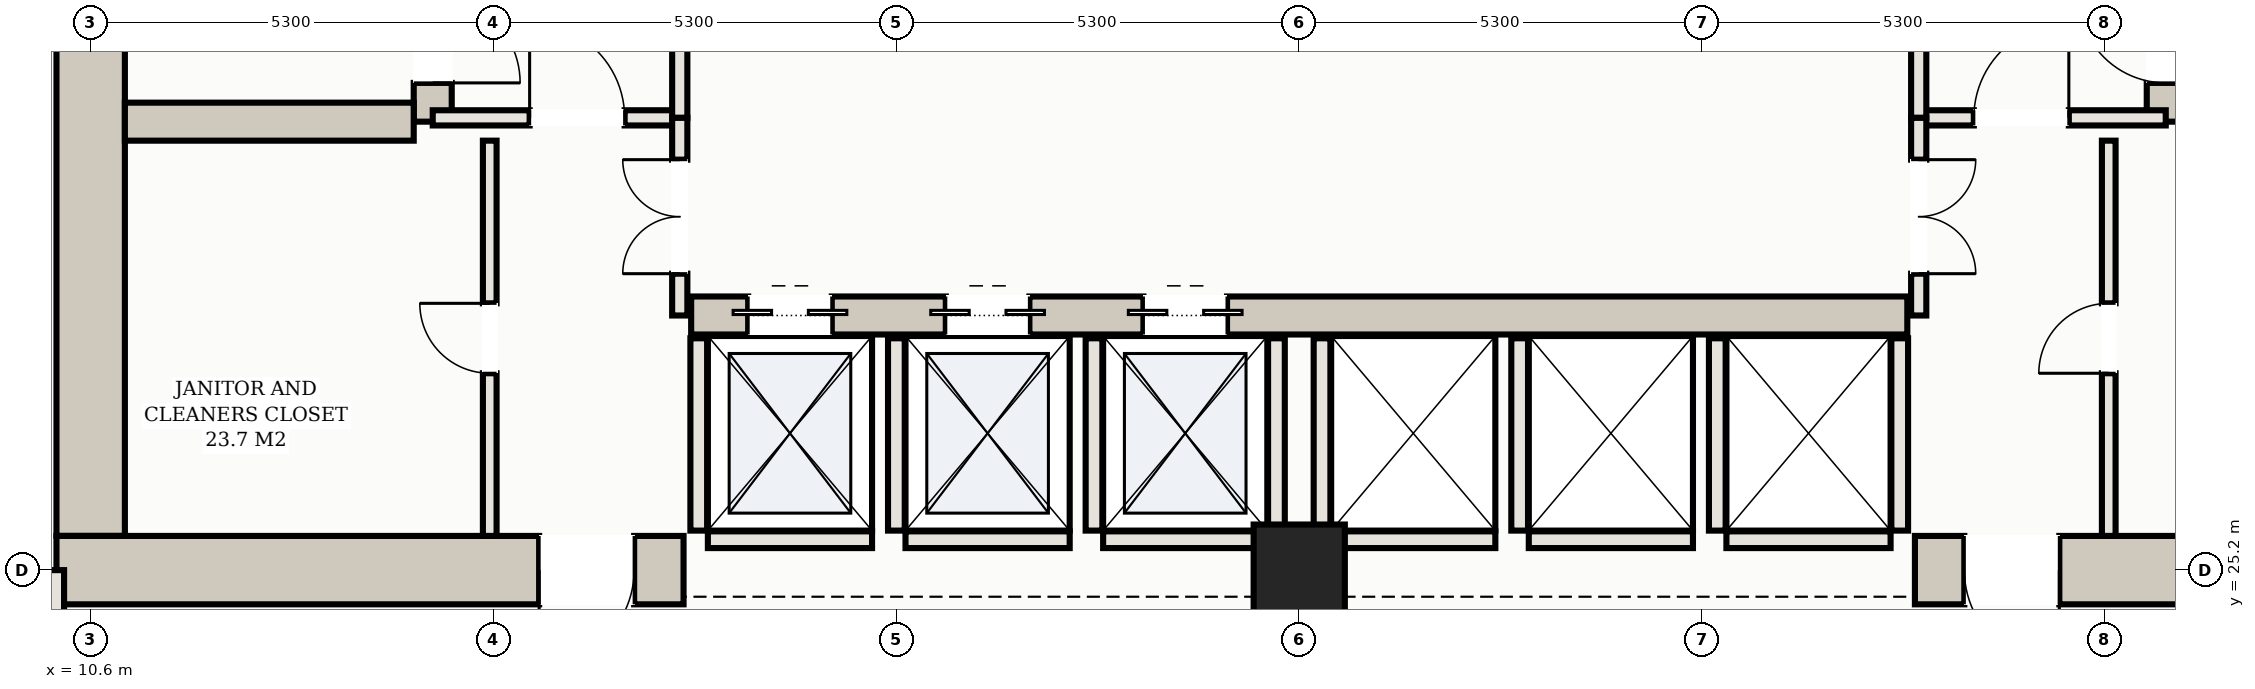
"""IFC4 building model, lengths in metres.
Left out: names, types, materials, properties, quantities, classifications, styles, units other than length and angle.
Written with IfcOpenShell. Run it as: python <this file> out.ifc"""

import sys

from ifc_helpers import new_model, si_unit, direction, frame, frame_2d, origin, origin_2d, place, context, subcontext, project, spatial, rectangle, hollow_rectangle, extrude, element, fill, save


model = new_model("IFC4")
c1 = context("Model", 3, precision=1e-05, world=origin(), true_north=direction((0.0, 1.0)))
c2 = subcontext(c1, "Body", "Model", "MODEL_VIEW")
j1 = project(units=[si_unit("LENGTHUNIT", "METRE"), si_unit("PLANEANGLEUNIT", "RADIAN")], contexts=[c1])
p1 = place(None, origin())
s1 = spatial("IfcSite", under=j1, at=p1, CompositionType="ELEMENT")
p2 = place(p1, origin())
s2 = spatial("IfcBuilding", under=s1, at=p2, CompositionType="ELEMENT")
p3 = place(p2, frame((0.0, 0.0, 24.2)))
s3 = spatial("IfcBuildingStorey", under=s2, at=p3, CompositionType="ELEMENT", Elevation=24.2)
p4 = place(p3, frame((10.6, 25.65, 0.0), z_axis=(0.0, 0.0, 1.0), x_axis=(0.0, 1.0, 0.0)))
e1 = element("IfcWall", 1, at=p4, inside=s3, PredefinedType="SHEAR", context=c2, shape_type="SweptSolid", body=[
    extrude(rectangle(XDim=13.9, YDim=0.9, at=frame_2d((6.95, 0.0))), origin(), (0.0, 0.0, 1.0), 3.08),
])
p5 = place(p3, frame((10.15, 25.2, 0.0), z_axis=(0.0, 0.0, 1.0), x_axis=(1.0, 0.0, 0.0)))
e2 = element("IfcWall", 2, at=p5, inside=s3, PredefinedType="SHEAR", context=c2, shape_type="SweptSolid", body=[
    extrude(rectangle(XDim=8.25, YDim=0.9, at=frame_2d((4.125, 0.0))), origin(), (0.0, 0.0, 1.0), 3.08),
])
p6 = place(p5, frame((6.35, 0.0, 0.0)))
e3 = element("IfcOpeningElement", 3, at=p6, cuts=e2, PredefinedType="OPENING", context=c2, shape_type="SweptSolid", body=[
    extrude(rectangle(XDim=1.25, YDim=2.2, at=frame_2d((0.625, 1.1))), frame((0.0, 0.46, 0.0), z_axis=(0.0, -1.0, 0.0), x_axis=(1.0, 0.0, 0.0)), (0.0, 0.0, 1.0), 0.92),
])
p7 = place(p3, frame((34.6, 25.2, 0.0), z_axis=(0.0, 0.0, 1.0), x_axis=(1.0, 0.0, 0.0)))
e4 = element("IfcWall", 4, at=p7, inside=s3, PredefinedType="SHEAR", context=c2, shape_type="SweptSolid", body=[
    extrude(rectangle(XDim=8.25, YDim=0.9, at=frame_2d((4.125, 0.0))), origin(), (0.0, 0.0, 1.0), 3.08),
])
p8 = place(p7, frame((0.65, 0.0, 0.0)))
e5 = element("IfcOpeningElement", 5, at=p8, cuts=e4, PredefinedType="OPENING", context=c2, shape_type="SweptSolid", body=[
    extrude(rectangle(XDim=1.25, YDim=2.2, at=frame_2d((0.625, 1.1))), frame((0.0, 0.46, 0.0), z_axis=(0.0, -1.0, 0.0), x_axis=(1.0, 0.0, 0.0)), (0.0, 0.0, 1.0), 0.92),
])
p9 = place(p3, frame((15.1, 31.1, 0.0), z_axis=(0.0, 0.0, 1.0), x_axis=(0.0, 1.0, 0.0)))
e6 = element("IfcWall", 6, at=p9, inside=s3, PredefinedType="SHEAR", context=c2, shape_type="SweptSolid", body=[
    extrude(rectangle(XDim=8.45, YDim=0.5, at=frame_2d((4.225, 0.0))), origin(), (0.0, 0.0, 1.0), 3.08),
])
p10 = place(p9, frame((0.51, 0.0, 0.0)))
e7 = element("IfcOpeningElement", 7, at=p10, cuts=e6, PredefinedType="OPENING", context=c2, shape_type="SweptSolid", body=[
    extrude(rectangle(XDim=1.15, YDim=2.2, at=frame_2d((0.575, 1.1))), frame((0.0, 0.26, 0.0), z_axis=(0.0, -1.0, 0.0), x_axis=(1.0, 0.0, 0.0)), (0.0, 0.0, 1.0), 0.52),
])
p11 = place(p3, frame((11.05, 31.1, 0.0), z_axis=(0.0, 0.0, 1.0), x_axis=(1.0, 0.0, 0.0)))
e8 = element("IfcWall", 8, at=p11, inside=s3, PredefinedType="SHEAR", context=c2, shape_type="SweptSolid", body=[
    extrude(rectangle(XDim=3.8, YDim=0.5, at=frame_2d((1.9, 0.0))), origin(), (0.0, 0.0, 1.0), 3.08),
])
p12 = place(p3, frame((37.9, 31.1, 0.0), z_axis=(0.0, 0.0, 1.0), x_axis=(0.0, 1.0, 0.0)))
e9 = element("IfcWall", 9, at=p12, inside=s3, PredefinedType="SHEAR", context=c2, shape_type="SweptSolid", body=[
    extrude(rectangle(XDim=8.45, YDim=0.5, at=frame_2d((4.225, 0.0))), origin(), (0.0, 0.0, 1.0), 3.08),
])
p13 = place(p12, frame((0.51, 0.0, 0.0)))
e10 = element("IfcOpeningElement", 10, at=p13, cuts=e9, PredefinedType="OPENING", context=c2, shape_type="SweptSolid", body=[
    extrude(rectangle(XDim=1.15, YDim=2.2, at=frame_2d((0.575, 1.1))), frame((0.0, 0.26, 0.0), z_axis=(0.0, -1.0, 0.0), x_axis=(1.0, 0.0, 0.0)), (0.0, 0.0, 1.0), 0.52),
])
p14 = place(p3, frame((18.5, 28.55, 0.0), z_axis=(0.0, 0.0, 1.0), x_axis=(1.0, 0.0, 0.0)))
e11 = element("IfcWall", 11, at=p14, inside=s3, PredefinedType="SHEAR", context=c2, shape_type="SweptSolid", body=[
    extrude(rectangle(XDim=16.0, YDim=0.5, at=frame_2d((8.0, 0.0))), origin(), (0.0, 0.0, 1.0), 3.08),
])
p15 = place(p14, frame((0.75, 0.0, 0.0)))
e12 = element("IfcOpeningElement", 12, at=p15, cuts=e11, PredefinedType="OPENING", context=c2, shape_type="SweptSolid", body=[
    extrude(rectangle(XDim=1.1, YDim=2.15, at=frame_2d((0.55, 1.075))), frame((0.0, 0.26, 0.0), z_axis=(0.0, -1.0, 0.0), x_axis=(1.0, 0.0, 0.0)), (0.0, 0.0, 1.0), 0.52),
])
p16 = place(p14, frame((3.35, 0.0, 0.0)))
e13 = element("IfcOpeningElement", 13, at=p16, cuts=e11, PredefinedType="OPENING", context=c2, shape_type="SweptSolid", body=[
    extrude(rectangle(XDim=1.1, YDim=2.15, at=frame_2d((0.55, 1.075))), frame((0.0, 0.26, 0.0), z_axis=(0.0, -1.0, 0.0), x_axis=(1.0, 0.0, 0.0)), (0.0, 0.0, 1.0), 0.52),
])
p17 = place(p14, frame((5.95, 0.0, 0.0)))
e14 = element("IfcOpeningElement", 14, at=p17, cuts=e11, PredefinedType="OPENING", context=c2, shape_type="SweptSolid", body=[
    extrude(rectangle(XDim=1.1, YDim=2.15, at=frame_2d((0.55, 1.075))), frame((0.0, 0.26, 0.0), z_axis=(0.0, -1.0, 0.0), x_axis=(1.0, 0.0, 0.0)), (0.0, 0.0, 1.0), 0.52),
])
p18 = place(p3, frame((26.5, 25.2, 0.0), z_axis=(0.0, 0.0, 1.0), x_axis=(1.0, 0.0, 0.0)))
e15 = element("IfcColumn", 15, at=p18, inside=s3, PredefinedType="COLUMN", context=c2, shape_type="SweptSolid", body=[
    extrude(hollow_rectangle(XDim=1.2, YDim=1.2, WallThickness=0.04, at=origin_2d()), origin(), (0.0, 0.0, 1.0), 3.3),
])
p19 = place(p3, frame((18.6, 25.72, 0.0), z_axis=(0.0, 0.0, 1.0), x_axis=(0.0, 1.0, 0.0)))
e16 = element("IfcWall", 16, at=p19, inside=s3, PredefinedType="SOLIDWALL", context=c2, shape_type="SweptSolid", body=[
    extrude(rectangle(XDim=2.53, YDim=0.22, at=frame_2d((1.265, 0.0))), origin(), (0.0, 0.0, 1.0), 3.08),
])
p20 = place(p3, frame((18.72, 25.6, 0.0), z_axis=(0.0, 0.0, 1.0), x_axis=(1.0, 0.0, 0.0)))
e17 = element("IfcWall", 17, at=p20, inside=s3, PredefinedType="SOLIDWALL", context=c2, shape_type="SweptSolid", body=[
    extrude(rectangle(XDim=2.16, YDim=0.22, at=frame_2d((1.08, 0.0))), origin(), (0.0, 0.0, 1.0), 3.08),
])
p21 = place(p3, frame((21.2, 25.72, 0.0), z_axis=(0.0, 0.0, 1.0), x_axis=(0.0, 1.0, 0.0)))
e18 = element("IfcWall", 18, at=p21, inside=s3, PredefinedType="SOLIDWALL", context=c2, shape_type="SweptSolid", body=[
    extrude(rectangle(XDim=2.53, YDim=0.22, at=frame_2d((1.265, 0.0))), origin(), (0.0, 0.0, 1.0), 3.08),
])
p22 = place(p3, frame((21.32, 25.6, 0.0), z_axis=(0.0, 0.0, 1.0), x_axis=(1.0, 0.0, 0.0)))
e19 = element("IfcWall", 19, at=p22, inside=s3, PredefinedType="SOLIDWALL", context=c2, shape_type="SweptSolid", body=[
    extrude(rectangle(XDim=2.16, YDim=0.22, at=frame_2d((1.08, 0.0))), origin(), (0.0, 0.0, 1.0), 3.08),
])
for number, where, z_axis, x_axis in (
    (20, (23.8, 25.72, 0.0), (0.0, 0.0, 1.0), (0.0, 1.0, 0.0)),
    (21, (26.2, 25.72, 0.0), (0.0, 0.0, 1.0), (0.0, 1.0, 0.0)),
):
    element("IfcWall", number, at=place(p3, frame(where, z_axis=z_axis, x_axis=x_axis)), inside=s3, PredefinedType="SOLIDWALL", context=c2, shape_type="SweptSolid", body=[
        extrude(rectangle(XDim=2.53, YDim=0.22, at=frame_2d((1.265, 0.0))), origin(), (0.0, 0.0, 1.0), 3.08),
    ])
p23 = place(p3, frame((23.92, 25.6, 0.0), z_axis=(0.0, 0.0, 1.0), x_axis=(1.0, 0.0, 0.0)))
e22 = element("IfcWall", 22, at=p23, inside=s3, PredefinedType="SOLIDWALL", context=c2, shape_type="SweptSolid", body=[
    extrude(rectangle(XDim=2.16, YDim=0.22, at=frame_2d((1.08, 0.0))), origin(), (0.0, 0.0, 1.0), 3.08),
])
p24 = place(p3, frame((26.8, 25.72, 0.0), z_axis=(0.0, 0.0, 1.0), x_axis=(0.0, 1.0, 0.0)))
e23 = element("IfcWall", 23, at=p24, inside=s3, PredefinedType="SOLIDWALL", context=c2, shape_type="SweptSolid", body=[
    extrude(rectangle(XDim=2.53, YDim=0.22, at=frame_2d((1.265, 0.0))), origin(), (0.0, 0.0, 1.0), 3.08),
])
p25 = place(p3, frame((26.92, 25.6, 0.0), z_axis=(0.0, 0.0, 1.0), x_axis=(1.0, 0.0, 0.0)))
e24 = element("IfcWall", 24, at=p25, inside=s3, PredefinedType="SOLIDWALL", context=c2, shape_type="SweptSolid", body=[
    extrude(rectangle(XDim=2.16, YDim=0.22, at=frame_2d((1.08, 0.0))), origin(), (0.0, 0.0, 1.0), 3.08),
])
p26 = place(p3, frame((29.4, 25.72, 0.0), z_axis=(0.0, 0.0, 1.0), x_axis=(0.0, 1.0, 0.0)))
e25 = element("IfcWall", 25, at=p26, inside=s3, PredefinedType="SOLIDWALL", context=c2, shape_type="SweptSolid", body=[
    extrude(rectangle(XDim=2.53, YDim=0.22, at=frame_2d((1.265, 0.0))), origin(), (0.0, 0.0, 1.0), 3.08),
])
p27 = place(p3, frame((29.52, 25.6, 0.0), z_axis=(0.0, 0.0, 1.0), x_axis=(1.0, 0.0, 0.0)))
e26 = element("IfcWall", 26, at=p27, inside=s3, PredefinedType="SOLIDWALL", context=c2, shape_type="SweptSolid", body=[
    extrude(rectangle(XDim=2.16, YDim=0.22, at=frame_2d((1.08, 0.0))), origin(), (0.0, 0.0, 1.0), 3.08),
])
for number, where, z_axis, x_axis in (
    (27, (32.0, 25.72, 0.0), (0.0, 0.0, 1.0), (0.0, 1.0, 0.0)),
    (28, (34.4, 25.72, 0.0), (0.0, 0.0, 1.0), (0.0, 1.0, 0.0)),
):
    element("IfcWall", number, at=place(p3, frame(where, z_axis=z_axis, x_axis=x_axis)), inside=s3, PredefinedType="SOLIDWALL", context=c2, shape_type="SweptSolid", body=[
        extrude(rectangle(XDim=2.53, YDim=0.22, at=frame_2d((1.265, 0.0))), origin(), (0.0, 0.0, 1.0), 3.08),
    ])
p28 = place(p3, frame((32.12, 25.6, 0.0), z_axis=(0.0, 0.0, 1.0), x_axis=(1.0, 0.0, 0.0)))
e29 = element("IfcWall", 29, at=p28, inside=s3, PredefinedType="SOLIDWALL", context=c2, shape_type="SweptSolid", body=[
    extrude(rectangle(XDim=2.16, YDim=0.22, at=frame_2d((1.08, 0.0))), origin(), (0.0, 0.0, 1.0), 3.08),
])
p29 = place(p3, frame((15.1, 31.15, 0.0), z_axis=(0.0, 0.0, 1.0), x_axis=(1.0, 0.0, 0.0)))
e30 = element("IfcWall", 30, at=p29, inside=s3, PredefinedType="PARTITIONING", context=c2, shape_type="SweptSolid", body=[
    extrude(rectangle(XDim=3.25, YDim=0.2, at=frame_2d((1.625, 0.0))), origin(), (0.0, 0.0, 1.0), 2.57),
])
p30 = place(p29, frame((1.275, 0.0, 0.0)))
e31 = element("IfcOpeningElement", 31, at=p30, cuts=e30, PredefinedType="OPENING", context=c2, shape_type="SweptSolid", body=[
    extrude(rectangle(XDim=1.25, YDim=2.2, at=frame_2d((0.625, 1.1))), frame((0.0, 0.11, 0.0), z_axis=(0.0, -1.0, 0.0), x_axis=(1.0, 0.0, 0.0)), (0.0, 0.0, 1.0), 0.22),
])
p31 = place(p3, frame((18.35, 31.15, 0.0), z_axis=(0.0, 0.0, 1.0), x_axis=(0.0, 1.0, 0.0)))
e32 = element("IfcWall", 32, at=p31, inside=s3, PredefinedType="PARTITIONING", context=c2, shape_type="SweptSolid", body=[
    extrude(rectangle(XDim=5.15, YDim=0.2, at=frame_2d((2.575, 0.0))), origin(), (0.0, 0.0, 1.0), 2.57),
])
p32 = place(p31, frame((1.875, 0.0, 0.0)))
e33 = element("IfcOpeningElement", 33, at=p32, cuts=e32, PredefinedType="OPENING", context=c2, shape_type="SweptSolid", body=[
    extrude(rectangle(XDim=1.25, YDim=2.2, at=frame_2d((0.625, 1.1))), frame((0.0, 0.11, 0.0), z_axis=(0.0, -1.0, 0.0), x_axis=(1.0, 0.0, 0.0)), (0.0, 0.0, 1.0), 0.22),
])
p33 = place(p3, frame((34.65, 31.15, 0.0), z_axis=(0.0, 0.0, 1.0), x_axis=(1.0, 0.0, 0.0)))
e34 = element("IfcWall", 34, at=p33, inside=s3, PredefinedType="PARTITIONING", context=c2, shape_type="SweptSolid", body=[
    extrude(rectangle(XDim=3.25, YDim=0.2, at=frame_2d((1.625, 0.0))), origin(), (0.0, 0.0, 1.0), 2.57),
])
p34 = place(p33, frame((0.725, 0.0, 0.0)))
e35 = element("IfcOpeningElement", 35, at=p34, cuts=e34, PredefinedType="OPENING", context=c2, shape_type="SweptSolid", body=[
    extrude(rectangle(XDim=1.25, YDim=2.2, at=frame_2d((0.625, 1.1))), frame((0.0, 0.11, 0.0), z_axis=(0.0, -1.0, 0.0), x_axis=(1.0, 0.0, 0.0)), (0.0, 0.0, 1.0), 0.22),
])
p35 = place(p3, frame((34.65, 31.15, 0.0), z_axis=(0.0, 0.0, 1.0), x_axis=(0.0, 1.0, 0.0)))
e36 = element("IfcWall", 36, at=p35, inside=s3, PredefinedType="PARTITIONING", context=c2, shape_type="SweptSolid", body=[
    extrude(rectangle(XDim=5.15, YDim=0.2, at=frame_2d((2.575, 0.0))), origin(), (0.0, 0.0, 1.0), 2.57),
])
p36 = place(p35, frame((1.875, 0.0, 0.0)))
e37 = element("IfcOpeningElement", 37, at=p36, cuts=e36, PredefinedType="OPENING", context=c2, shape_type="SweptSolid", body=[
    extrude(rectangle(XDim=1.25, YDim=2.2, at=frame_2d((0.625, 1.1))), frame((0.0, 0.11, 0.0), z_axis=(0.0, -1.0, 0.0), x_axis=(1.0, 0.0, 0.0)), (0.0, 0.0, 1.0), 0.22),
])
p37 = place(p3, frame((15.85, 25.65, 0.0), z_axis=(0.0, 0.0, 1.0), x_axis=(0.0, 1.0, 0.0)))
e38 = element("IfcWall", 38, at=p37, inside=s3, PredefinedType="PARTITIONING", context=c2, shape_type="SweptSolid", body=[
    extrude(rectangle(XDim=5.2, YDim=0.18, at=frame_2d((2.6, 0.0))), origin(), (0.0, 0.0, 1.0), 2.57),
])
p38 = place(p37, frame((2.14, 0.0, 0.0)))
e39 = element("IfcOpeningElement", 39, at=p38, cuts=e38, PredefinedType="OPENING", context=c2, shape_type="SweptSolid", body=[
    extrude(rectangle(XDim=0.92, YDim=2.15, at=frame_2d((0.46, 1.075))), frame((0.0, 0.1, 0.0), z_axis=(0.0, -1.0, 0.0), x_axis=(1.0, 0.0, 0.0)), (0.0, 0.0, 1.0), 0.2),
])
p39 = place(p3, frame((37.15, 25.65, 0.0), z_axis=(0.0, 0.0, 1.0), x_axis=(0.0, 1.0, 0.0)))
e40 = element("IfcWall", 40, at=p39, inside=s3, PredefinedType="PARTITIONING", context=c2, shape_type="SweptSolid", body=[
    extrude(rectangle(XDim=5.2, YDim=0.18, at=frame_2d((2.6, 0.0))), origin(), (0.0, 0.0, 1.0), 2.57),
])
p40 = place(p39, frame((2.14, 0.0, 0.0)))
e41 = element("IfcOpeningElement", 41, at=p40, cuts=e40, PredefinedType="OPENING", context=c2, shape_type="SweptSolid", body=[
    extrude(rectangle(XDim=0.92, YDim=2.15, at=frame_2d((0.46, 1.075))), frame((0.0, 0.1, 0.0), z_axis=(0.0, -1.0, 0.0), x_axis=(1.0, 0.0, 0.0)), (0.0, 0.0, 1.0), 0.2),
])
p41 = place(p3, frame((18.35, 28.55, 0.0), z_axis=(0.0, 0.0, 1.0), x_axis=(0.0, 1.0, 0.0)))
e42 = element("IfcWall", 42, at=p41, inside=s3, PredefinedType="PARTITIONING", context=c2, shape_type="SweptSolid", body=[
    extrude(rectangle(XDim=2.6, YDim=0.2, at=frame_2d((1.3, 0.0))), origin(), (0.0, 0.0, 1.0), 2.57),
])
p42 = place(p41, frame((0.55, 0.0, 0.0)))
e43 = element("IfcOpeningElement", 43, at=p42, cuts=e42, PredefinedType="OPENING", context=c2, shape_type="SweptSolid", body=[
    extrude(rectangle(XDim=1.5, YDim=2.25, at=frame_2d((0.75, 1.125))), frame((0.0, 0.11, 0.0), z_axis=(0.0, -1.0, 0.0), x_axis=(1.0, 0.0, 0.0)), (0.0, 0.0, 1.0), 0.22),
])
p43 = place(p3, frame((34.65, 28.55, 0.0), z_axis=(0.0, 0.0, 1.0), x_axis=(0.0, 1.0, 0.0)))
e44 = element("IfcWall", 44, at=p43, inside=s3, PredefinedType="PARTITIONING", context=c2, shape_type="SweptSolid", body=[
    extrude(rectangle(XDim=2.6, YDim=0.2, at=frame_2d((1.3, 0.0))), origin(), (0.0, 0.0, 1.0), 2.57),
])
p44 = place(p43, frame((0.55, 0.0, 0.0)))
e45 = element("IfcOpeningElement", 45, at=p44, cuts=e44, PredefinedType="OPENING", context=c2, shape_type="SweptSolid", body=[
    extrude(rectangle(XDim=1.5, YDim=2.25, at=frame_2d((0.75, 1.125))), frame((0.0, 0.11, 0.0), z_axis=(0.0, -1.0, 0.0), x_axis=(1.0, 0.0, 0.0)), (0.0, 0.0, 1.0), 0.22),
])
p45 = place(p3, frame((10.15, 24.1, 0.0), z_axis=(0.0, 0.0, 1.0), x_axis=(0.0, 1.0, 0.0)))
e46 = element("IfcWall", 46, at=p45, inside=s3, PredefinedType="PARTITIONING", context=c2, shape_type="SweptSolid", body=[
    extrude(rectangle(XDim=1.1, YDim=0.2, at=frame_2d((0.55, 0.0))), origin(), (0.0, 0.0, 1.0), 2.57),
])
p46 = place(p15, origin())
e47 = element("IfcDoor", 47, at=p46, inside=s3, OperationType="DOUBLE_DOOR_SLIDING", PredefinedType="DOOR", context=c2, shape_type="SweptSolid", body=[
    extrude(rectangle(XDim=1.1, YDim=2.15, at=frame_2d((0.55, 1.075))), frame((0.0, 0.025, 0.0), z_axis=(0.0, -1.0, 0.0), x_axis=(1.0, 0.0, 0.0)), (0.0, 0.0, 1.0), 0.05),
])
fill(e12, e47)
p47 = place(p16, origin())
e48 = element("IfcDoor", 48, at=p47, inside=s3, OperationType="DOUBLE_DOOR_SLIDING", PredefinedType="DOOR", context=c2, shape_type="SweptSolid", body=[
    extrude(rectangle(XDim=1.1, YDim=2.15, at=frame_2d((0.55, 1.075))), frame((0.0, 0.025, 0.0), z_axis=(0.0, -1.0, 0.0), x_axis=(1.0, 0.0, 0.0)), (0.0, 0.0, 1.0), 0.05),
])
fill(e13, e48)
p48 = place(p17, origin())
e49 = element("IfcDoor", 49, at=p48, inside=s3, OperationType="DOUBLE_DOOR_SLIDING", PredefinedType="DOOR", context=c2, shape_type="SweptSolid", body=[
    extrude(rectangle(XDim=1.1, YDim=2.15, at=frame_2d((0.55, 1.075))), frame((0.0, 0.025, 0.0), z_axis=(0.0, -1.0, 0.0), x_axis=(1.0, 0.0, 0.0)), (0.0, 0.0, 1.0), 0.05),
])
fill(e14, e49)
p49 = place(p6, frame((1.25, 0.0, 0.0), z_axis=(0.0, 0.0, 1.0), x_axis=(-1.0, 0.0, 0.0)))
e50 = element("IfcDoor", 50, at=p49, inside=s3, OperationType="SINGLE_SWING_RIGHT", PredefinedType="DOOR", context=c2, shape_type="SweptSolid", body=[
    extrude(rectangle(XDim=1.25, YDim=2.2, at=frame_2d((0.625, 1.1))), frame((0.0, 0.025, 0.0), z_axis=(0.0, -1.0, 0.0), x_axis=(1.0, 0.0, 0.0)), (0.0, 0.0, 1.0), 0.05),
])
fill(e3, e50)
p50 = place(p8, frame((1.25, 0.0, 0.0), z_axis=(0.0, 0.0, 1.0), x_axis=(-1.0, 0.0, 0.0)))
e51 = element("IfcDoor", 51, at=p50, inside=s3, OperationType="SINGLE_SWING_LEFT", PredefinedType="DOOR", context=c2, shape_type="SweptSolid", body=[
    extrude(rectangle(XDim=1.25, YDim=2.2, at=frame_2d((0.625, 1.1))), frame((0.0, 0.025, 0.0), z_axis=(0.0, -1.0, 0.0), x_axis=(1.0, 0.0, 0.0)), (0.0, 0.0, 1.0), 0.05),
])
fill(e5, e51)
p51 = place(p30, origin())
e52 = element("IfcDoor", 52, at=p51, inside=s3, OperationType="SINGLE_SWING_LEFT", PredefinedType="DOOR", context=c2, shape_type="SweptSolid", body=[
    extrude(rectangle(XDim=1.25, YDim=2.2, at=frame_2d((0.625, 1.1))), frame((0.0, 0.025, 0.0), z_axis=(0.0, -1.0, 0.0), x_axis=(1.0, 0.0, 0.0)), (0.0, 0.0, 1.0), 0.05),
])
fill(e31, e52)
p52 = place(p34, origin())
e53 = element("IfcDoor", 53, at=p52, inside=s3, OperationType="SINGLE_SWING_RIGHT", PredefinedType="DOOR", context=c2, shape_type="SweptSolid", body=[
    extrude(rectangle(XDim=1.25, YDim=2.2, at=frame_2d((0.625, 1.1))), frame((0.0, 0.025, 0.0), z_axis=(0.0, -1.0, 0.0), x_axis=(1.0, 0.0, 0.0)), (0.0, 0.0, 1.0), 0.05),
])
fill(e35, e53)
p53 = place(p10, frame((1.15, 0.0, 0.0), z_axis=(0.0, 0.0, 1.0), x_axis=(-1.0, 0.0, 0.0)))
e54 = element("IfcDoor", 54, at=p53, inside=s3, OperationType="SINGLE_SWING_RIGHT", PredefinedType="DOOR", context=c2, shape_type="SweptSolid", body=[
    extrude(rectangle(XDim=1.15, YDim=2.2, at=frame_2d((0.575, 1.1))), frame((0.0, 0.025, 0.0), z_axis=(0.0, -1.0, 0.0), x_axis=(1.0, 0.0, 0.0)), (0.0, 0.0, 1.0), 0.05),
])
fill(e7, e54)
p54 = place(p13, origin())
e55 = element("IfcDoor", 55, at=p54, inside=s3, OperationType="SINGLE_SWING_RIGHT", PredefinedType="DOOR", context=c2, shape_type="SweptSolid", body=[
    extrude(rectangle(XDim=1.15, YDim=2.2, at=frame_2d((0.575, 1.1))), frame((0.0, 0.025, 0.0), z_axis=(0.0, -1.0, 0.0), x_axis=(1.0, 0.0, 0.0)), (0.0, 0.0, 1.0), 0.05),
])
fill(e10, e55)
p55 = place(p38, origin())
e56 = element("IfcDoor", 56, at=p55, inside=s3, OperationType="SINGLE_SWING_RIGHT", PredefinedType="DOOR", context=c2, shape_type="SweptSolid", body=[
    extrude(rectangle(XDim=0.92, YDim=2.15, at=frame_2d((0.46, 1.075))), frame((0.0, 0.025, 0.0), z_axis=(0.0, -1.0, 0.0), x_axis=(1.0, 0.0, 0.0)), (0.0, 0.0, 1.0), 0.05),
])
fill(e39, e56)
p56 = place(p40, origin())
e57 = element("IfcDoor", 57, at=p56, inside=s3, OperationType="SINGLE_SWING_LEFT", PredefinedType="DOOR", context=c2, shape_type="SweptSolid", body=[
    extrude(rectangle(XDim=0.92, YDim=2.15, at=frame_2d((0.46, 1.075))), frame((0.0, 0.025, 0.0), z_axis=(0.0, -1.0, 0.0), x_axis=(1.0, 0.0, 0.0)), (0.0, 0.0, 1.0), 0.05),
])
fill(e41, e57)
p57 = place(p42, origin())
e58 = element("IfcDoor", 58, at=p57, inside=s3, OperationType="DOUBLE_DOOR_SINGLE_SWING", PredefinedType="DOOR", context=c2, shape_type="SweptSolid", body=[
    extrude(rectangle(XDim=1.5, YDim=2.25, at=frame_2d((0.75, 1.125))), frame((0.0, 0.025, 0.0), z_axis=(0.0, -1.0, 0.0), x_axis=(1.0, 0.0, 0.0)), (0.0, 0.0, 1.0), 0.05),
])
fill(e43, e58)
p58 = place(p44, frame((1.5, 0.0, 0.0), z_axis=(0.0, 0.0, 1.0), x_axis=(-1.0, 0.0, 0.0)))
e59 = element("IfcDoor", 59, at=p58, inside=s3, OperationType="DOUBLE_DOOR_SINGLE_SWING", PredefinedType="DOOR", context=c2, shape_type="SweptSolid", body=[
    extrude(rectangle(XDim=1.5, YDim=2.25, at=frame_2d((0.75, 1.125))), frame((0.0, 0.025, 0.0), z_axis=(0.0, -1.0, 0.0), x_axis=(1.0, 0.0, 0.0)), (0.0, 0.0, 1.0), 0.05),
])
fill(e45, e59)
save(model, sys.argv[1])
